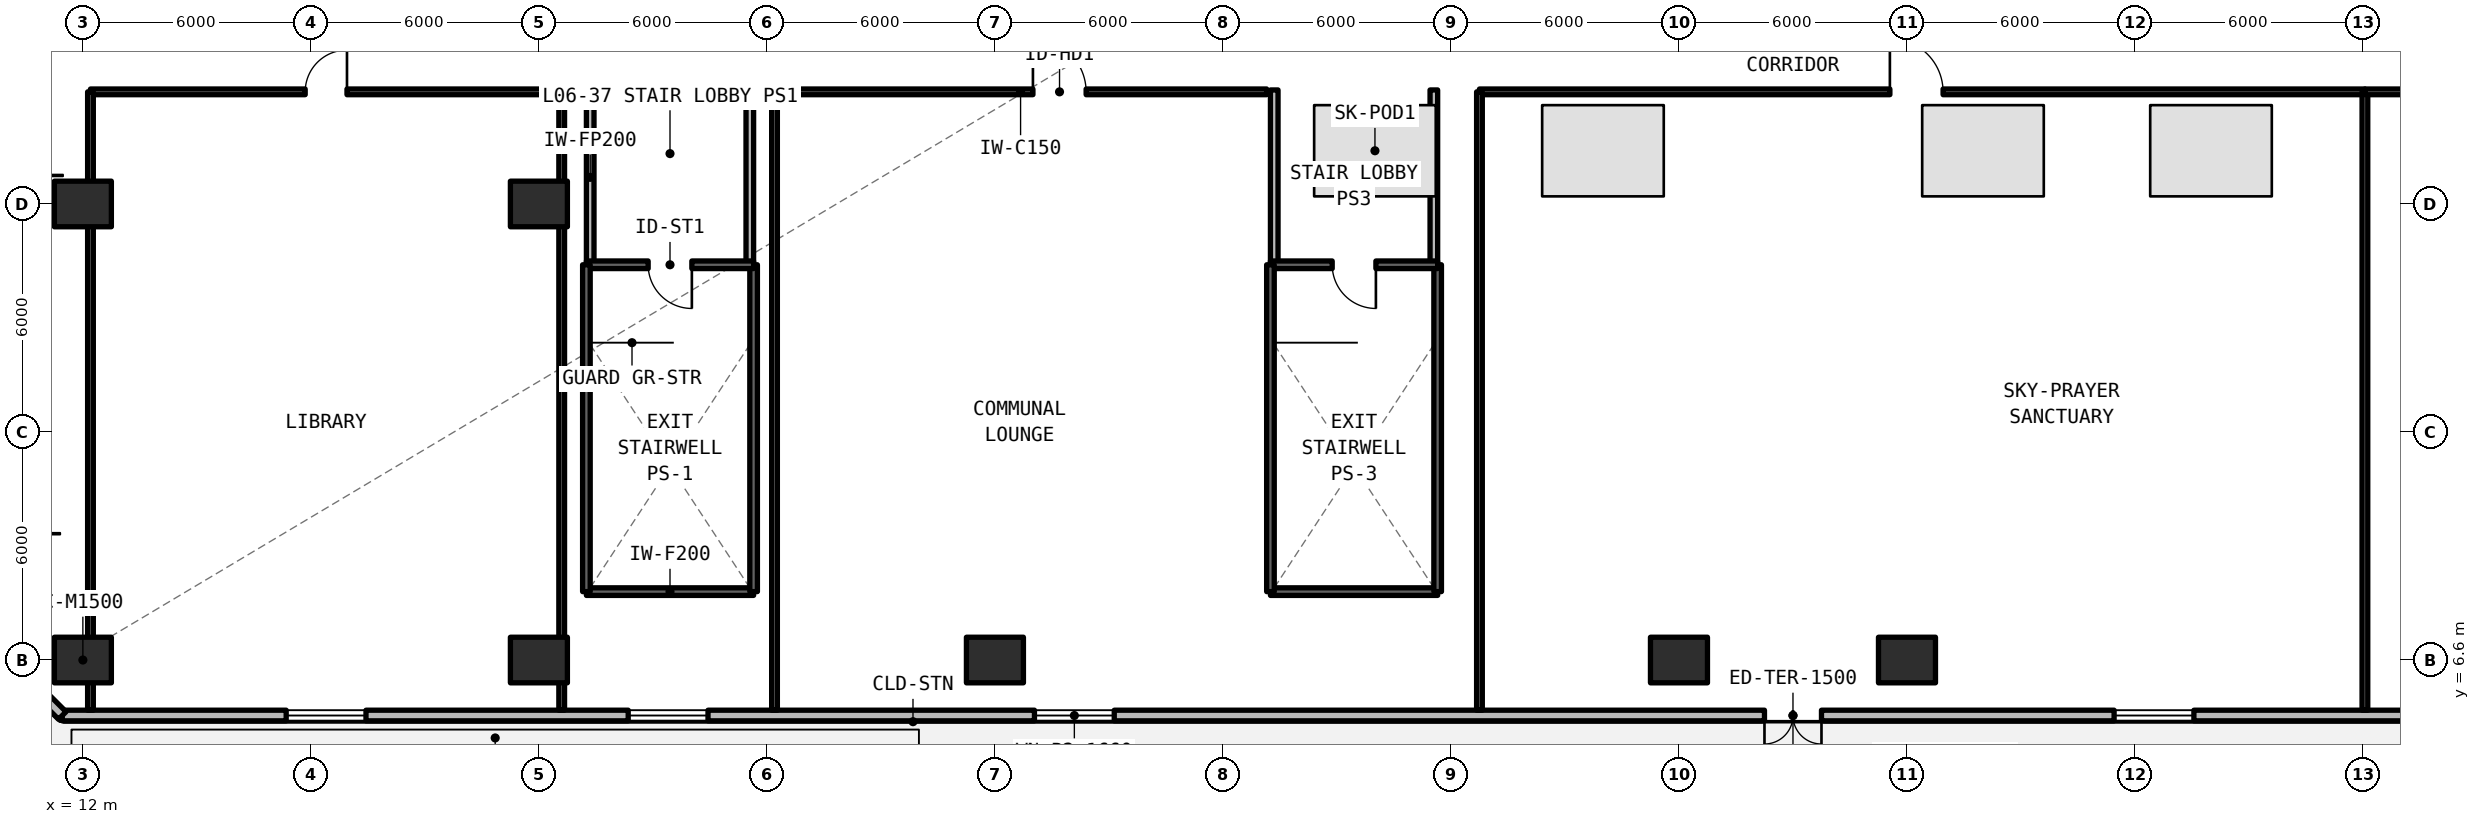
"""IFC4 building model, lengths in metres.
Left out: names, types, materials, properties, quantities, classifications, styles, units other than length and angle.
Written with IfcOpenShell. Run it as: python <this file> out.ifc"""

import sys

from ifc_helpers import new_model, si_unit, direction, frame, frame_2d, origin, origin_2d, place, context, subcontext, project, spatial, rectangle, extrude, element, fill, save


model = new_model("IFC4")
c1 = context("Model", 3, precision=1e-05, world=origin(), true_north=direction((0.0, 1.0)))
c2 = subcontext(c1, "Body", "Model", "MODEL_VIEW")
j1 = project(units=[si_unit("LENGTHUNIT", "METRE"), si_unit("PLANEANGLEUNIT", "RADIAN")], contexts=[c1])
p1 = place(None, origin())
s1 = spatial("IfcSite", under=j1, at=p1, CompositionType="ELEMENT")
p2 = place(p1, origin())
s2 = spatial("IfcBuilding", under=s1, at=p2, CompositionType="ELEMENT")
p3 = place(p2, frame((0.0, 0.0, 24.09)))
s3 = spatial("IfcBuildingStorey", under=s2, at=p3, CompositionType="ELEMENT", Elevation=24.09)
for number, where, z_axis, x_axis in (
    (1, (12.0, 6.6, 0.0), (0.0, 0.0, 1.0), (1.0, 0.0, 0.0)),
    (2, (24.0, 6.6, 0.0), (0.0, 0.0, 1.0), (1.0, 0.0, 0.0)),
    (3, (36.0, 6.6, 0.0), (0.0, 0.0, 1.0), (1.0, 0.0, 0.0)),
    (4, (54.0, 6.6, 0.0), (0.0, 0.0, 1.0), (1.0, 0.0, 0.0)),
    (5, (60.0, 6.6, 0.0), (0.0, 0.0, 1.0), (1.0, 0.0, 0.0)),
    (6, (12.0, 18.6, 0.0), (0.0, 0.0, 1.0), (1.0, 0.0, 0.0)),
):
    element("IfcColumn", number, at=place(p3, frame(where, z_axis=z_axis, x_axis=x_axis)), inside=s3, PredefinedType="COLUMN", context=c2, shape_type="SweptSolid", body=[
        extrude(rectangle(XDim=1.5, YDim=1.2, at=origin_2d()), origin(), (0.0, 0.0, 1.0), 4.71),
    ])
p4 = place(p3, frame((24.0, 18.6, 0.0), z_axis=(0.0, 0.0, 1.0), x_axis=(1.0, 0.0, 0.0)))
e7 = element("IfcColumn", 7, at=p4, inside=s3, PredefinedType="COLUMN", context=c2, shape_type="SweptSolid", body=[
    extrude(rectangle(XDim=1.5, YDim=1.2, at=origin_2d()), origin(), (0.0, 0.0, 1.0), 4.95),
])
p5 = place(p3, frame((11.458, 5.14, 0.0), z_axis=(0.0, 0.0, 1.0), x_axis=(1.0, 0.0, 0.0)))
e8 = element("IfcWall", 8, at=p5, inside=s3, PredefinedType="SOLIDWALL", context=c2, shape_type="SweptSolid", body=[
    extrude(rectangle(XDim=91.084, YDim=0.28, at=frame_2d((45.542, 0.0))), origin(), (0.0, 0.0, 1.0), 4.71),
])
p6 = place(p5, frame((44.792, 0.0, 0.0)))
e9 = element("IfcOpeningElement", 9, at=p6, cuts=e8, PredefinedType="OPENING", context=c2, shape_type="SweptSolid", body=[
    extrude(rectangle(XDim=1.5, YDim=2.2, at=frame_2d((0.75, 1.1))), frame((0.0, 0.15, 0.0), z_axis=(0.0, -1.0, 0.0), x_axis=(1.0, 0.0, 0.0)), (0.0, 0.0, 1.0), 0.3),
])
p7 = place(p5, frame((25.582, 0.0, 0.78)))
e10 = element("IfcOpeningElement", 10, at=p7, cuts=e8, PredefinedType="OPENING", context=c2, shape_type="SweptSolid", body=[
    extrude(rectangle(XDim=2.1, YDim=1.66, at=frame_2d((1.05, 0.83))), frame((0.0, 0.15, 0.0), z_axis=(0.0, -1.0, 0.0), x_axis=(1.0, 0.0, 0.0)), (0.0, 0.0, 1.0), 0.3),
])
p8 = place(p5, frame((67.512, 0.0, 0.78)))
e11 = element("IfcOpeningElement", 11, at=p8, cuts=e8, PredefinedType="OPENING", context=c2, shape_type="SweptSolid", body=[
    extrude(rectangle(XDim=2.1, YDim=1.66, at=frame_2d((1.05, 0.83))), frame((0.0, 0.15, 0.0), z_axis=(0.0, -1.0, 0.0), x_axis=(1.0, 0.0, 0.0)), (0.0, 0.0, 1.0), 0.3),
])
p9 = place(p5, frame((5.892, 0.0, 0.78)))
e12 = element("IfcOpeningElement", 12, at=p9, cuts=e8, PredefinedType="OPENING", context=c2, shape_type="SweptSolid", body=[
    extrude(rectangle(XDim=2.1, YDim=1.66, at=frame_2d((1.05, 0.83))), frame((0.0, 0.15, 0.0), z_axis=(0.0, -1.0, 0.0), x_axis=(1.0, 0.0, 0.0)), (0.0, 0.0, 1.0), 0.3),
])
p10 = place(p5, frame((82.842, 0.0, 0.78)))
e13 = element("IfcOpeningElement", 13, at=p10, cuts=e8, PredefinedType="OPENING", context=c2, shape_type="SweptSolid", body=[
    extrude(rectangle(XDim=2.1, YDim=1.66, at=frame_2d((1.05, 0.83))), frame((0.0, 0.15, 0.0), z_axis=(0.0, -1.0, 0.0), x_axis=(1.0, 0.0, 0.0)), (0.0, 0.0, 1.0), 0.3),
])
p11 = place(p5, frame((14.892, 0.0, 0.78)))
e14 = element("IfcOpeningElement", 14, at=p11, cuts=e8, PredefinedType="OPENING", context=c2, shape_type="SweptSolid", body=[
    extrude(rectangle(XDim=2.1, YDim=1.66, at=frame_2d((1.05, 0.83))), frame((0.0, 0.15, 0.0), z_axis=(0.0, -1.0, 0.0), x_axis=(1.0, 0.0, 0.0)), (0.0, 0.0, 1.0), 0.3),
])
p12 = place(p5, frame((53.992, 0.0, 0.78)))
e15 = element("IfcOpeningElement", 15, at=p12, cuts=e8, PredefinedType="OPENING", context=c2, shape_type="SweptSolid", body=[
    extrude(rectangle(XDim=2.1, YDim=1.66, at=frame_2d((1.05, 0.83))), frame((0.0, 0.15, 0.0), z_axis=(0.0, -1.0, 0.0), x_axis=(1.0, 0.0, 0.0)), (0.0, 0.0, 1.0), 0.3),
])
p13 = place(p5, frame((63.492, 0.0, 0.78)))
e16 = element("IfcOpeningElement", 16, at=p13, cuts=e8, PredefinedType="OPENING", context=c2, shape_type="SweptSolid", body=[
    extrude(rectangle(XDim=2.1, YDim=1.66, at=frame_2d((1.05, 0.83))), frame((0.0, 0.15, 0.0), z_axis=(0.0, -1.0, 0.0), x_axis=(1.0, 0.0, 0.0)), (0.0, 0.0, 1.0), 0.3),
])
p14 = place(p3, frame((9.14, 7.458, 0.0), z_axis=(0.0, 0.0, 1.0), x_axis=(0.707106781187, -0.707106781187, 0.0)))
e17 = element("IfcWall", 17, at=p14, inside=s3, PredefinedType="SOLIDWALL", context=c2, shape_type="SweptSolid", body=[
    extrude(rectangle(XDim=3.278, YDim=0.28, at=frame_2d((1.639, 0.0))), origin(), (0.0, 0.0, 1.0), 4.71),
])
p15 = place(p14, frame((0.894, 0.0, 0.78)))
e18 = element("IfcOpeningElement", 18, at=p15, cuts=e17, PredefinedType="OPENING", context=c2, shape_type="SweptSolid", body=[
    extrude(rectangle(XDim=0.85, YDim=1.65, at=frame_2d((0.425, 0.825))), frame((0.0, 0.15, 0.0), z_axis=(0.0, -1.0, 0.0), x_axis=(1.0, 0.0, 0.0)), (0.0, 0.0, 1.0), 0.3),
])
for number, where, z_axis, x_axis in (
    (19, (25.35, 17.0, 0.0), (0.0, 0.0, 1.0), (0.0, 1.0, 0.0)),
    (20, (29.55, 17.0, 0.0), (0.0, 0.0, 1.0), (0.0, 1.0, 0.0)),
    (21, (43.35, 17.0, 0.0), (0.0, 0.0, 1.0), (0.0, 1.0, 0.0)),
    (22, (47.55, 17.0, 0.0), (0.0, 0.0, 1.0), (0.0, 1.0, 0.0)),
):
    element("IfcWall", number, at=place(p3, frame(where, z_axis=z_axis, x_axis=x_axis)), inside=s3, PredefinedType="SOLIDWALL", context=c2, shape_type="SweptSolid", body=[
        extrude(rectangle(XDim=4.6, YDim=0.2, at=frame_2d((2.3, 0.0))), origin(), (0.0, 0.0, 1.0), 3.93),
    ])
p16 = place(p3, frame((30.2, 21.55, 0.0), z_axis=(0.0, 0.0, 1.0), x_axis=(1.0, 0.0, 0.0)))
e23 = element("IfcWall", 23, at=p16, inside=s3, PredefinedType="SOLIDWALL", context=c2, shape_type="SweptSolid", body=[
    extrude(rectangle(XDim=12.95, YDim=0.15, at=frame_2d((6.475, 0.0))), origin(), (0.0, 0.0, 1.0), 3.93),
])
p17 = place(p16, frame((6.8, 0.0, 0.0)))
e24 = element("IfcOpeningElement", 24, at=p17, cuts=e23, PredefinedType="OPENING", context=c2, shape_type="SweptSolid", body=[
    extrude(rectangle(XDim=1.4, YDim=2.15, at=frame_2d((0.7, 1.075))), frame((0.0, 0.085, 0.0), z_axis=(0.0, -1.0, 0.0), x_axis=(1.0, 0.0, 0.0)), (0.0, 0.0, 1.0), 0.17),
])
p18 = place(p3, frame((30.2, 5.28, 0.0), z_axis=(0.0, 0.0, 1.0), x_axis=(0.0, 1.0, 0.0)))
e25 = element("IfcWall", 25, at=p18, inside=s3, PredefinedType="SOLIDWALL", context=c2, shape_type="SweptSolid", body=[
    extrude(rectangle(XDim=16.27, YDim=0.15, at=frame_2d((8.135, 0.0))), origin(), (0.0, 0.0, 1.0), 3.687),
])
p19 = place(p3, frame((48.75, 21.55, 0.0), z_axis=(0.0, 0.0, 1.0), x_axis=(1.0, 0.0, 0.0)))
e26 = element("IfcWall", 26, at=p19, inside=s3, PredefinedType="SOLIDWALL", context=c2, shape_type="SweptSolid", body=[
    extrude(rectangle(XDim=23.3, YDim=0.15, at=frame_2d((11.65, 0.0))), origin(), (0.0, 0.0, 1.0), 3.93),
])
p20 = place(p19, frame((10.8, 0.0, 0.0)))
e27 = element("IfcOpeningElement", 27, at=p20, cuts=e26, PredefinedType="OPENING", context=c2, shape_type="SweptSolid", body=[
    extrude(rectangle(XDim=1.4, YDim=2.15, at=frame_2d((0.7, 1.075))), frame((0.0, 0.085, 0.0), z_axis=(0.0, -1.0, 0.0), x_axis=(1.0, 0.0, 0.0)), (0.0, 0.0, 1.0), 0.17),
])
p21 = place(p3, frame((48.75, 5.28, 0.0), z_axis=(0.0, 0.0, 1.0), x_axis=(0.0, 1.0, 0.0)))
e28 = element("IfcWall", 28, at=p21, inside=s3, PredefinedType="SOLIDWALL", context=c2, shape_type="SweptSolid", body=[
    extrude(rectangle(XDim=16.27, YDim=0.15, at=frame_2d((8.135, 0.0))), origin(), (0.0, 0.0, 1.0), 3.93),
])
p22 = place(p3, frame((72.05, 5.28, 0.0), z_axis=(0.0, 0.0, 1.0), x_axis=(0.0, 1.0, 0.0)))
e29 = element("IfcWall", 29, at=p22, inside=s3, PredefinedType="SOLIDWALL", context=c2, shape_type="SweptSolid", body=[
    extrude(rectangle(XDim=16.27, YDim=0.15, at=frame_2d((8.135, 0.0))), origin(), (0.0, 0.0, 1.0), 3.687),
])
p23 = place(p3, frame((72.05, 21.55, 0.0), z_axis=(0.0, 0.0, 1.0), x_axis=(1.0, 0.0, 0.0)))
e30 = element("IfcWall", 30, at=p23, inside=s3, PredefinedType="SOLIDWALL", context=c2, shape_type="SweptSolid", body=[
    extrude(rectangle(XDim=11.95, YDim=0.15, at=frame_2d((5.975, 0.0))), origin(), (0.0, 0.0, 1.0), 3.93),
])
p24 = place(p23, frame((5.425, 0.0, 0.0)))
e31 = element("IfcOpeningElement", 31, at=p24, cuts=e30, PredefinedType="OPENING", context=c2, shape_type="SweptSolid", body=[
    extrude(rectangle(XDim=1.1, YDim=2.15, at=frame_2d((0.55, 1.075))), frame((0.0, 0.085, 0.0), z_axis=(0.0, -1.0, 0.0), x_axis=(1.0, 0.0, 0.0)), (0.0, 0.0, 1.0), 0.17),
])
p25 = place(p3, frame((12.2, 21.55, 0.0), z_axis=(0.0, 0.0, 1.0), x_axis=(1.0, 0.0, 0.0)))
e32 = element("IfcWall", 32, at=p25, inside=s3, PredefinedType="SOLIDWALL", context=c2, shape_type="SweptSolid", body=[
    extrude(rectangle(XDim=12.4, YDim=0.15, at=frame_2d((6.2, 0.0))), origin(), (0.0, 0.0, 1.0), 3.93),
])
p26 = place(p25, frame((5.65, 0.0, 0.0)))
e33 = element("IfcOpeningElement", 33, at=p26, cuts=e32, PredefinedType="OPENING", context=c2, shape_type="SweptSolid", body=[
    extrude(rectangle(XDim=1.1, YDim=2.15, at=frame_2d((0.55, 1.075))), frame((0.0, 0.085, 0.0), z_axis=(0.0, -1.0, 0.0), x_axis=(1.0, 0.0, 0.0)), (0.0, 0.0, 1.0), 0.17),
])
for number, where, z_axis, x_axis in (
    (34, (12.2, 5.28, 0.0), (0.0, 0.0, 1.0), (0.0, 1.0, 0.0)),
    (35, (24.6, 5.28, 0.0), (0.0, 0.0, 1.0), (0.0, 1.0, 0.0)),
):
    element("IfcWall", number, at=place(p3, frame(where, z_axis=z_axis, x_axis=x_axis)), inside=s3, PredefinedType="SOLIDWALL", context=c2, shape_type="SweptSolid", body=[
        extrude(rectangle(XDim=16.27, YDim=0.15, at=frame_2d((8.135, 0.0))), origin(), (0.0, 0.0, 1.0), 3.93),
    ])
p27 = place(p3, frame((25.25, 8.4, 0.0), z_axis=(0.0, 0.0, 1.0), x_axis=(1.0, 0.0, 0.0)))
e36 = element("IfcWall", 36, at=p27, inside=s3, PredefinedType="SOLIDWALL", context=c2, shape_type="SweptSolid", body=[
    extrude(rectangle(XDim=4.4, YDim=0.2, at=frame_2d((2.2, 0.0))), origin(), (0.0, 0.0, 1.0), 4.95),
])
p28 = place(p3, frame((29.65, 8.4, 0.0), z_axis=(0.0, 0.0, 1.0), x_axis=(0.0, 1.0, 0.0)))
e37 = element("IfcWall", 37, at=p28, inside=s3, PredefinedType="SOLIDWALL", context=c2, shape_type="SweptSolid", body=[
    extrude(rectangle(XDim=8.6, YDim=0.2, at=frame_2d((4.3, 0.0))), origin(), (0.0, 0.0, 1.0), 4.95),
])
p29 = place(p3, frame((29.65, 17.0, 0.0), z_axis=(0.0, 0.0, 1.0), x_axis=(-1.0, 0.0, 0.0)))
e38 = element("IfcWall", 38, at=p29, inside=s3, PredefinedType="SOLIDWALL", context=c2, shape_type="SweptSolid", body=[
    extrude(rectangle(XDim=4.4, YDim=0.2, at=frame_2d((2.2, 0.0))), origin(), (0.0, 0.0, 1.0), 4.95),
])
p30 = place(p29, frame((1.625, 0.0, 0.0)))
e39 = element("IfcOpeningElement", 39, at=p30, cuts=e38, PredefinedType="OPENING", context=c2, shape_type="SweptSolid", body=[
    extrude(rectangle(XDim=1.15, YDim=2.15, at=frame_2d((0.575, 1.075))), frame((0.0, 0.11, 0.0), z_axis=(0.0, -1.0, 0.0), x_axis=(1.0, 0.0, 0.0)), (0.0, 0.0, 1.0), 0.22),
])
p31 = place(p3, frame((25.25, 17.0, 0.0), z_axis=(0.0, 0.0, 1.0), x_axis=(0.0, -1.0, 0.0)))
e40 = element("IfcWall", 40, at=p31, inside=s3, PredefinedType="SOLIDWALL", context=c2, shape_type="SweptSolid", body=[
    extrude(rectangle(XDim=8.6, YDim=0.2, at=frame_2d((4.3, 0.0))), origin(), (0.0, 0.0, 1.0), 4.95),
])
p32 = place(p3, frame((43.25, 8.4, 0.0), z_axis=(0.0, 0.0, 1.0), x_axis=(1.0, 0.0, 0.0)))
e41 = element("IfcWall", 41, at=p32, inside=s3, PredefinedType="SOLIDWALL", context=c2, shape_type="SweptSolid", body=[
    extrude(rectangle(XDim=4.4, YDim=0.2, at=frame_2d((2.2, 0.0))), origin(), (0.0, 0.0, 1.0), 4.95),
])
p33 = place(p3, frame((47.65, 8.4, 0.0), z_axis=(0.0, 0.0, 1.0), x_axis=(0.0, 1.0, 0.0)))
e42 = element("IfcWall", 42, at=p33, inside=s3, PredefinedType="SOLIDWALL", context=c2, shape_type="SweptSolid", body=[
    extrude(rectangle(XDim=8.6, YDim=0.2, at=frame_2d((4.3, 0.0))), origin(), (0.0, 0.0, 1.0), 4.95),
])
p34 = place(p3, frame((47.65, 17.0, 0.0), z_axis=(0.0, 0.0, 1.0), x_axis=(-1.0, 0.0, 0.0)))
e43 = element("IfcWall", 43, at=p34, inside=s3, PredefinedType="SOLIDWALL", context=c2, shape_type="SweptSolid", body=[
    extrude(rectangle(XDim=4.4, YDim=0.2, at=frame_2d((2.2, 0.0))), origin(), (0.0, 0.0, 1.0), 4.95),
])
p35 = place(p34, frame((1.625, 0.0, 0.0)))
e44 = element("IfcOpeningElement", 44, at=p35, cuts=e43, PredefinedType="OPENING", context=c2, shape_type="SweptSolid", body=[
    extrude(rectangle(XDim=1.15, YDim=2.15, at=frame_2d((0.575, 1.075))), frame((0.0, 0.11, 0.0), z_axis=(0.0, -1.0, 0.0), x_axis=(1.0, 0.0, 0.0)), (0.0, 0.0, 1.0), 0.22),
])
p36 = place(p3, frame((43.25, 17.0, 0.0), z_axis=(0.0, 0.0, 1.0), x_axis=(0.0, -1.0, 0.0)))
e45 = element("IfcWall", 45, at=p36, inside=s3, PredefinedType="SOLIDWALL", context=c2, shape_type="SweptSolid", body=[
    extrude(rectangle(XDim=8.6, YDim=0.2, at=frame_2d((4.3, 0.0))), origin(), (0.0, 0.0, 1.0), 4.95),
])
p37 = place(p6, frame((1.5, 0.0, 0.0), z_axis=(0.0, 0.0, 1.0), x_axis=(-1.0, 0.0, 0.0)))
e46 = element("IfcDoor", 46, at=p37, inside=s3, OperationType="SINGLE_SWING_RIGHT", PredefinedType="DOOR", context=c2, shape_type="SweptSolid", body=[
    extrude(rectangle(XDim=1.5, YDim=2.2, at=frame_2d((0.75, 1.1))), frame((0.0, 0.025, 0.0), z_axis=(0.0, -1.0, 0.0), x_axis=(1.0, 0.0, 0.0)), (0.0, 0.0, 1.0), 0.05),
])
fill(e9, e46)
p38 = place(p7, origin())
e47 = element("IfcWindow", 47, at=p38, inside=s3, PartitioningType="SINGLE_PANEL", PredefinedType="WINDOW", context=c2, shape_type="SweptSolid", body=[
    extrude(rectangle(XDim=2.1, YDim=1.66, at=frame_2d((1.05, 0.83))), frame((0.0, 0.03, 0.0), z_axis=(0.0, -1.0, 0.0), x_axis=(1.0, 0.0, 0.0)), (0.0, 0.0, 1.0), 0.06),
])
fill(e10, e47)
p39 = place(p9, origin())
e48 = element("IfcWindow", 48, at=p39, inside=s3, PartitioningType="SINGLE_PANEL", PredefinedType="WINDOW", context=c2, shape_type="SweptSolid", body=[
    extrude(rectangle(XDim=2.1, YDim=1.66, at=frame_2d((1.05, 0.83))), frame((0.0, 0.03, 0.0), z_axis=(0.0, -1.0, 0.0), x_axis=(1.0, 0.0, 0.0)), (0.0, 0.0, 1.0), 0.06),
])
fill(e12, e48)
p40 = place(p11, origin())
e49 = element("IfcWindow", 49, at=p40, inside=s3, PartitioningType="SINGLE_PANEL", PredefinedType="WINDOW", context=c2, shape_type="SweptSolid", body=[
    extrude(rectangle(XDim=2.1, YDim=1.66, at=frame_2d((1.05, 0.83))), frame((0.0, 0.03, 0.0), z_axis=(0.0, -1.0, 0.0), x_axis=(1.0, 0.0, 0.0)), (0.0, 0.0, 1.0), 0.06),
])
fill(e14, e49)
p41 = place(p12, origin())
e50 = element("IfcWindow", 50, at=p41, inside=s3, PartitioningType="SINGLE_PANEL", PredefinedType="WINDOW", context=c2, shape_type="SweptSolid", body=[
    extrude(rectangle(XDim=2.1, YDim=1.66, at=frame_2d((1.05, 0.83))), frame((0.0, 0.03, 0.0), z_axis=(0.0, -1.0, 0.0), x_axis=(1.0, 0.0, 0.0)), (0.0, 0.0, 1.0), 0.06),
])
fill(e15, e50)
p42 = place(p3, frame((0.0, 0.0, -0.35)))
p43 = place(p42, frame((46.0, 20.0, 0.0)))
p44 = place(p43, frame((0.0, 0.0, 0.3)))
e51 = element("IfcWindow", 51, at=p44, inside=s3, PartitioningType="SINGLE_PANEL", PredefinedType="SKYLIGHT", context=c2, shape_type="SweptSolid", body=[
    extrude(rectangle(XDim=3.2, YDim=2.4, at=origin_2d()), origin(), (0.0, 0.0, 1.0), 0.05),
])
p45 = place(p42, frame((52.0, 20.0, 0.0)))
p46 = place(p45, frame((0.0, 0.0, 0.3)))
e52 = element("IfcWindow", 52, at=p46, inside=s3, PartitioningType="SINGLE_PANEL", PredefinedType="SKYLIGHT", context=c2, shape_type="SweptSolid", body=[
    extrude(rectangle(XDim=3.2, YDim=2.4, at=origin_2d()), origin(), (0.0, 0.0, 1.0), 0.05),
])
p47 = place(p42, frame((62.0, 20.0, 0.0)))
p48 = place(p47, frame((0.0, 0.0, 0.3)))
e53 = element("IfcWindow", 53, at=p48, inside=s3, PartitioningType="SINGLE_PANEL", PredefinedType="SKYLIGHT", context=c2, shape_type="SweptSolid", body=[
    extrude(rectangle(XDim=3.2, YDim=2.4, at=origin_2d()), origin(), (0.0, 0.0, 1.0), 0.05),
])
p49 = place(p42, frame((68.0, 20.0, 0.0)))
p50 = place(p49, frame((0.0, 0.0, 0.3)))
e54 = element("IfcWindow", 54, at=p50, inside=s3, PartitioningType="SINGLE_PANEL", PredefinedType="SKYLIGHT", context=c2, shape_type="SweptSolid", body=[
    extrude(rectangle(XDim=3.2, YDim=2.4, at=origin_2d()), origin(), (0.0, 0.0, 1.0), 0.05),
])
p51 = place(p17, origin())
e55 = element("IfcDoor", 55, at=p51, inside=s3, OperationType="SINGLE_SWING_RIGHT", PredefinedType="DOOR", context=c2, shape_type="SweptSolid", body=[
    extrude(rectangle(XDim=1.4, YDim=2.15, at=frame_2d((0.7, 1.075))), frame((0.0, 0.025, 0.0), z_axis=(0.0, -1.0, 0.0), x_axis=(1.0, 0.0, 0.0)), (0.0, 0.0, 1.0), 0.05),
])
fill(e24, e55)
p52 = place(p20, origin())
e56 = element("IfcDoor", 56, at=p52, inside=s3, OperationType="SINGLE_SWING_LEFT", PredefinedType="DOOR", context=c2, shape_type="SweptSolid", body=[
    extrude(rectangle(XDim=1.4, YDim=2.15, at=frame_2d((0.7, 1.075))), frame((0.0, 0.025, 0.0), z_axis=(0.0, -1.0, 0.0), x_axis=(1.0, 0.0, 0.0)), (0.0, 0.0, 1.0), 0.05),
])
fill(e27, e56)
p53 = place(p26, origin())
e57 = element("IfcDoor", 57, at=p53, inside=s3, OperationType="SINGLE_SWING_RIGHT", PredefinedType="DOOR", context=c2, shape_type="SweptSolid", body=[
    extrude(rectangle(XDim=1.1, YDim=2.15, at=frame_2d((0.55, 1.075))), frame((0.0, 0.025, 0.0), z_axis=(0.0, -1.0, 0.0), x_axis=(1.0, 0.0, 0.0)), (0.0, 0.0, 1.0), 0.05),
])
fill(e33, e57)
p54 = place(p30, origin())
e58 = element("IfcDoor", 58, at=p54, inside=s3, OperationType="SINGLE_SWING_RIGHT", PredefinedType="DOOR", context=c2, shape_type="SweptSolid", body=[
    extrude(rectangle(XDim=1.15, YDim=2.15, at=frame_2d((0.575, 1.075))), frame((0.0, 0.025, 0.0), z_axis=(0.0, -1.0, 0.0), x_axis=(1.0, 0.0, 0.0)), (0.0, 0.0, 1.0), 0.05),
])
fill(e39, e58)
p55 = place(p35, origin())
e59 = element("IfcDoor", 59, at=p55, inside=s3, OperationType="SINGLE_SWING_RIGHT", PredefinedType="DOOR", context=c2, shape_type="SweptSolid", body=[
    extrude(rectangle(XDim=1.15, YDim=2.15, at=frame_2d((0.575, 1.075))), frame((0.0, 0.025, 0.0), z_axis=(0.0, -1.0, 0.0), x_axis=(1.0, 0.0, 0.0)), (0.0, 0.0, 1.0), 0.05),
])
fill(e44, e59)
save(model, sys.argv[1])
